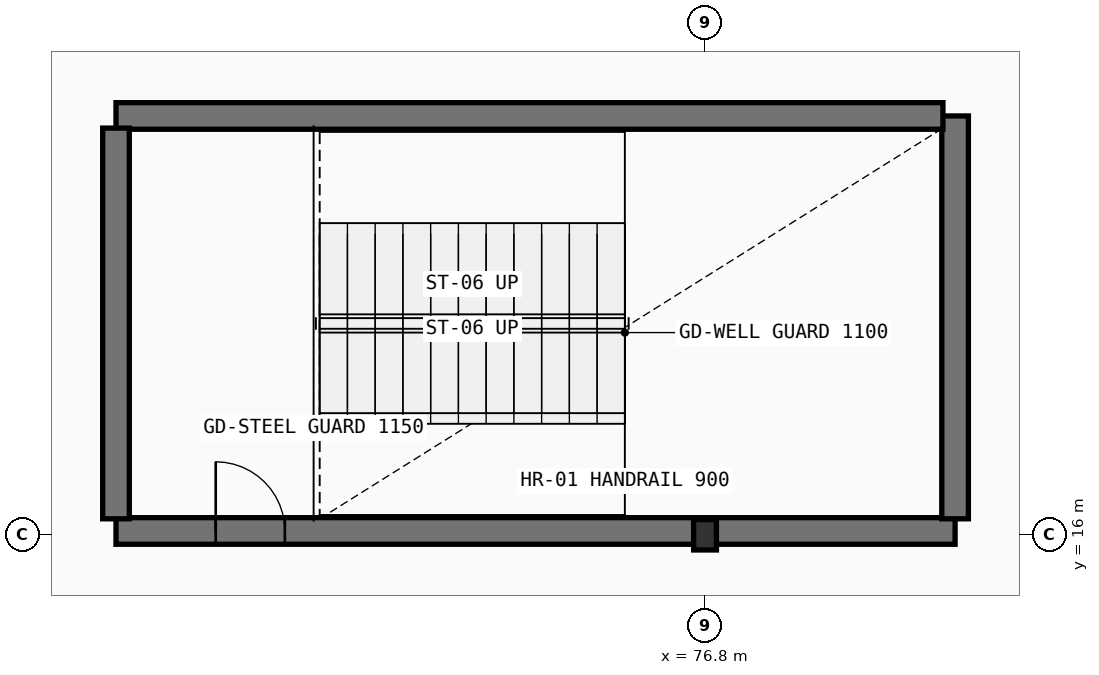
"""IFC4 building model, lengths in metres.
Left out: names, types, materials, properties, quantities, classifications, styles, units other than length and angle.
Written with IfcOpenShell. Run it as: python <this file> out.ifc"""

import sys

from ifc_helpers import new_model, si_unit, direction, frame, frame_2d, origin, origin_2d, place, context, subcontext, project, spatial, rectangle, i_section, extrude, element, fill, save


model = new_model("IFC4")
c1 = context("Model", 3, precision=1e-05, world=origin(), true_north=direction((0.0, 1.0)))
c2 = subcontext(c1, "Body", "Model", "MODEL_VIEW")
j1 = project(units=[si_unit("LENGTHUNIT", "METRE"), si_unit("PLANEANGLEUNIT", "RADIAN")], contexts=[c1])
p1 = place(None, origin())
s1 = spatial("IfcSite", under=j1, at=p1, CompositionType="ELEMENT")
p2 = place(p1, origin())
s2 = spatial("IfcBuilding", under=s1, at=p2, CompositionType="ELEMENT")
p3 = place(p2, frame((0.0, 0.0, 24.9)))
s3 = spatial("IfcBuildingStorey", under=s2, at=p3, CompositionType="ELEMENT", Elevation=24.9)
p4 = place(p3, frame((76.8, 16.0, 0.0), z_axis=(0.0, 0.0, 1.0), x_axis=(1.0, 0.0, 0.0)))
e1 = element("IfcColumn", 1, at=p4, inside=s3, PredefinedType="COLUMN", context=c2, shape_type="SweptSolid", body=[
    extrude(i_section(OverallWidth=0.3, OverallDepth=0.4, WebThickness=0.013, FlangeThickness=0.024, FilletRadius=0.027, at=origin_2d()), origin(), (0.0, 0.0, 1.0), 4.5),
])
p5 = place(p3, frame((69.05, 16.05, 0.0), z_axis=(0.0, 0.0, 1.0), x_axis=(1.0, 0.0, 0.0)))
e2 = element("IfcWall", 2, at=p5, inside=s3, PredefinedType="SHEAR", context=c2, shape_type="SweptSolid", body=[
    extrude(rectangle(XDim=11.04, YDim=0.35, at=frame_2d((5.52, 0.0))), origin(), (0.0, 0.0, 1.0), 4.27),
])
p6 = place(p5, frame((1.312, 0.0, 0.0)))
e3 = element("IfcOpeningElement", 3, at=p6, cuts=e2, PredefinedType="OPENING", context=c2, shape_type="SweptSolid", body=[
    extrude(rectangle(XDim=0.91, YDim=2.08, at=frame_2d((0.455, 1.04))), frame((0.0, 0.185, 0.0), z_axis=(0.0, -1.0, 0.0), x_axis=(1.0, 0.0, 0.0)), (0.0, 0.0, 1.0), 0.37),
])
p7 = place(p3, frame((80.09, 16.21, 0.0), z_axis=(0.0, 0.0, 1.0), x_axis=(0.0, 1.0, 0.0)))
e4 = element("IfcWall", 4, at=p7, inside=s3, PredefinedType="SHEAR", context=c2, shape_type="SweptSolid", body=[
    extrude(rectangle(XDim=5.3, YDim=0.35, at=frame_2d((2.65, 0.0))), origin(), (0.0, 0.0, 1.0), 4.27),
])
p8 = place(p3, frame((79.93, 21.51, 0.0), z_axis=(0.0, 0.0, 1.0), x_axis=(-1.0, 0.0, 0.0)))
e5 = element("IfcWall", 5, at=p8, inside=s3, PredefinedType="SHEAR", context=c2, shape_type="SweptSolid", body=[
    extrude(rectangle(XDim=10.88, YDim=0.35, at=frame_2d((5.44, 0.0))), origin(), (0.0, 0.0, 1.0), 4.27),
])
p9 = place(p3, frame((69.05, 21.35, 0.0), z_axis=(0.0, 0.0, 1.0), x_axis=(0.0, -1.0, 0.0)))
e6 = element("IfcWall", 6, at=p9, inside=s3, PredefinedType="SHEAR", context=c2, shape_type="SweptSolid", body=[
    extrude(rectangle(XDim=5.14, YDim=0.35, at=frame_2d((2.57, 0.0))), origin(), (0.0, 0.0, 1.0), 4.27),
])
p10 = place(p6, origin())
e7 = element("IfcDoor", 7, at=p10, inside=s3, OperationType="SINGLE_SWING_RIGHT", PredefinedType="DOOR", context=c2, shape_type="SweptSolid", body=[
    extrude(rectangle(XDim=0.91, YDim=2.08, at=frame_2d((0.455, 1.04))), frame((0.0, 0.025, 0.0), z_axis=(0.0, -1.0, 0.0), x_axis=(1.0, 0.0, 0.0)), (0.0, 0.0, 1.0), 0.05),
])
fill(e3, e7)
save(model, sys.argv[1])
